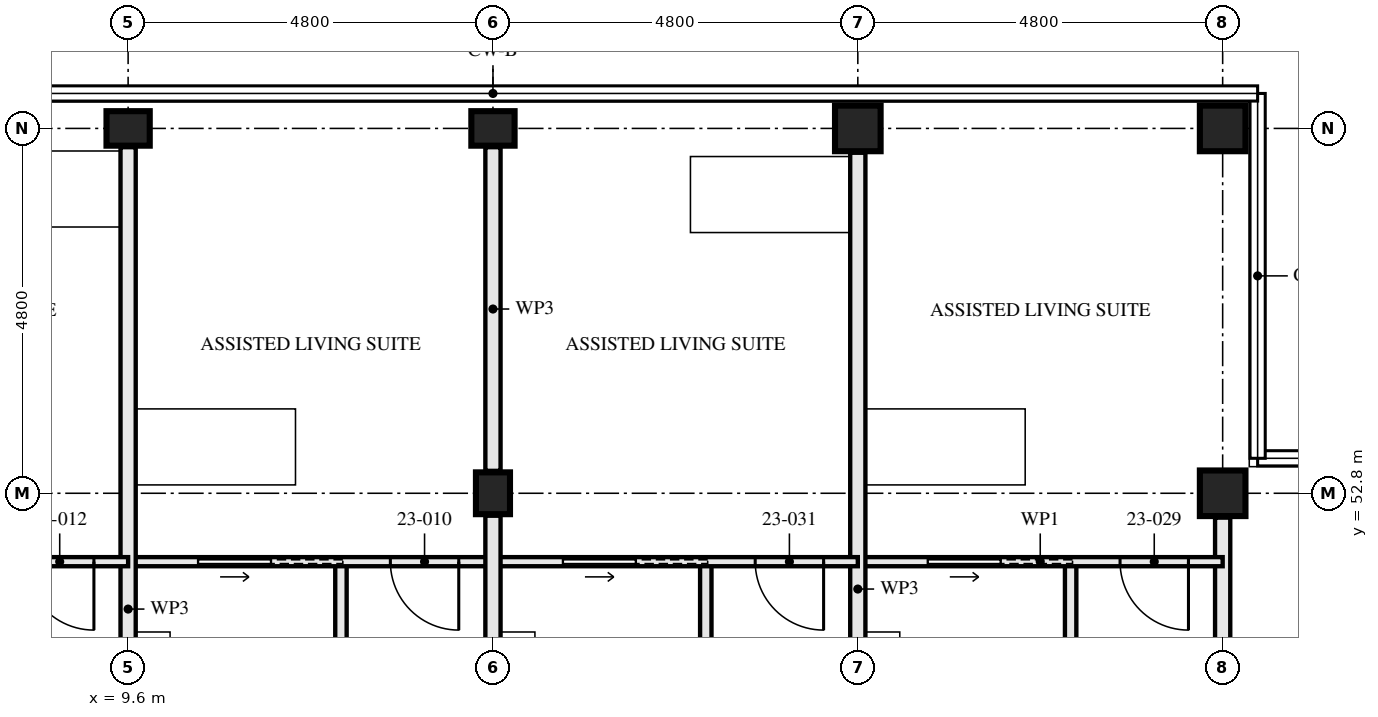
"""IFC4 building model, lengths in metres.
Left out: names, types, materials, properties, quantities, classifications, styles, units other than length and angle.
Written with IfcOpenShell. Run it as: python <this file> out.ifc"""

import sys

from ifc_helpers import new_model, si_unit, direction, frame, frame_2d, origin, origin_2d, place, context, subcontext, project, spatial, rectangle, hollow_rectangle, i_section, extrude, element, fill, save


model = new_model("IFC4")
c1 = context("Model", 3, precision=1e-05, world=origin(), true_north=direction((0.0, 1.0)))
c2 = subcontext(c1, "Body", "Model", "MODEL_VIEW")
j1 = project(units=[si_unit("LENGTHUNIT", "METRE"), si_unit("PLANEANGLEUNIT", "RADIAN")], contexts=[c1])
p1 = place(None, origin())
s1 = spatial("IfcSite", under=j1, at=p1, CompositionType="ELEMENT")
p2 = place(p1, origin())
s2 = spatial("IfcBuilding", under=s1, at=p2, CompositionType="ELEMENT")
p3 = place(p2, frame((0.0, 0.0, 87.5)))
s3 = spatial("IfcBuildingStorey", under=s2, at=p3, CompositionType="ELEMENT", Elevation=87.5)
p4 = place(p3, frame((9.6, 57.6, 0.0), z_axis=(0.0, 0.0, 1.0), x_axis=(0.0, 1.0, 0.0)))
e1 = element("IfcColumn", 1, at=p4, inside=s3, PredefinedType="COLUMN", context=c2, shape_type="SweptSolid", body=[
    extrude(i_section(OverallWidth=0.454, OverallDepth=0.569, WebThickness=0.078, FlangeThickness=0.125, FilletRadius=0.015, at=origin_2d()), origin(), (0.0, 0.0, 1.0), 3.5),
])
p5 = place(p3, frame((14.4, 52.8, 0.0), z_axis=(0.0, 0.0, 1.0), x_axis=(1.0, 0.0, 0.0)))
e2 = element("IfcColumn", 2, at=p5, inside=s3, PredefinedType="COLUMN", context=c2, shape_type="SweptSolid", body=[
    extrude(i_section(OverallWidth=0.448, OverallDepth=0.55, WebThickness=0.072, FlangeThickness=0.115, FilletRadius=0.015, at=origin_2d()), origin(), (0.0, 0.0, 1.0), 3.5),
])
p6 = place(p3, frame((14.4, 57.6, 0.0), z_axis=(0.0, 0.0, 1.0), x_axis=(0.0, 1.0, 0.0)))
e3 = element("IfcColumn", 3, at=p6, inside=s3, PredefinedType="COLUMN", context=c2, shape_type="SweptSolid", body=[
    extrude(i_section(OverallWidth=0.454, OverallDepth=0.569, WebThickness=0.078, FlangeThickness=0.125, FilletRadius=0.015, at=origin_2d()), origin(), (0.0, 0.0, 1.0), 3.5),
])
for number, where, z_axis, x_axis in (
    (4, (19.2, 57.6, 0.0), (0.0, 0.0, 1.0), (0.0, 1.0, 0.0)),
    (5, (24.0, 52.8, 0.0), (0.0, 0.0, 1.0), (0.0, 1.0, 0.0)),
    (6, (24.0, 57.6, 0.0), (0.0, 0.0, 1.0), (0.0, 1.0, 0.0)),
):
    element("IfcColumn", number, at=place(p3, frame(where, z_axis=z_axis, x_axis=x_axis)), inside=s3, PredefinedType="COLUMN", context=c2, shape_type="SweptSolid", body=[
        extrude(hollow_rectangle(XDim=0.6, YDim=0.6, WallThickness=0.08, at=origin_2d()), origin(), (0.0, 0.0, 1.0), 3.5),
    ])
p7 = place(p3, frame((12.4, 51.9, 0.0), z_axis=(0.0, 0.0, 1.0), x_axis=(0.0, -1.0, 0.0)))
e7 = element("IfcWall", 7, at=p7, inside=s3, PredefinedType="PARTITIONING", context=c2, shape_type="SweptSolid", body=[
    extrude(rectangle(XDim=3.0, YDim=0.15, at=frame_2d((1.5, 0.0))), origin(), (0.0, 0.0, 1.0), 3.33),
])
p8 = place(p3, frame((14.4, 51.9, 0.0), z_axis=(0.0, 0.0, 1.0), x_axis=(-1.0, 0.0, 0.0)))
e8 = element("IfcWall", 8, at=p8, inside=s3, PredefinedType="PARTITIONING", context=c2, shape_type="SweptSolid", body=[
    extrude(rectangle(XDim=4.8, YDim=0.12, at=frame_2d((2.4, 0.0))), origin(), (0.0, 0.0, 1.0), 3.33),
])
p9 = place(p8, frame((0.45, 0.0, 0.0)))
e9 = element("IfcOpeningElement", 9, at=p9, cuts=e8, PredefinedType="OPENING", context=c2, shape_type="SweptSolid", body=[
    extrude(rectangle(XDim=0.9, YDim=2.1, at=frame_2d((0.45, 1.05))), frame((0.0, 0.071, 0.0), z_axis=(0.0, -1.0, 0.0), x_axis=(1.0, 0.0, 0.0)), (0.0, 0.0, 1.0), 0.141),
])
p10 = place(p8, frame((2.925, 0.0, 0.0)))
e10 = element("IfcOpeningElement", 10, at=p10, cuts=e8, PredefinedType="OPENING", context=c2, shape_type="SweptSolid", body=[
    extrude(rectangle(XDim=0.95, YDim=2.1, at=frame_2d((0.475, 1.05))), frame((0.0, 0.071, 0.0), z_axis=(0.0, -1.0, 0.0), x_axis=(1.0, 0.0, 0.0)), (0.0, 0.0, 1.0), 0.141),
])
p11 = place(p3, frame((9.6, 57.353, 0.0), z_axis=(0.0, 0.0, 1.0), x_axis=(0.0, -1.0, 0.0)))
e11 = element("IfcWall", 11, at=p11, inside=s3, PredefinedType="PARTITIONING", context=c2, shape_type="SweptSolid", body=[
    extrude(rectangle(XDim=12.153, YDim=0.2, at=frame_2d((6.077, 0.0))), origin(), (0.0, 0.0, 1.0), 2.55),
])
p12 = place(p3, frame((9.6, 51.9, 0.0), z_axis=(0.0, 0.0, 1.0), x_axis=(-1.0, 0.0, 0.0)))
e12 = element("IfcWall", 12, at=p12, inside=s3, PredefinedType="PARTITIONING", context=c2, shape_type="SweptSolid", body=[
    extrude(rectangle(XDim=4.8, YDim=0.12, at=frame_2d((2.4, 0.0))), origin(), (0.0, 0.0, 1.0), 3.33),
])
p13 = place(p12, frame((0.45, 0.0, 0.0)))
e13 = element("IfcOpeningElement", 13, at=p13, cuts=e12, PredefinedType="OPENING", context=c2, shape_type="SweptSolid", body=[
    extrude(rectangle(XDim=0.9, YDim=2.1, at=frame_2d((0.45, 1.05))), frame((0.0, 0.071, 0.0), z_axis=(0.0, -1.0, 0.0), x_axis=(1.0, 0.0, 0.0)), (0.0, 0.0, 1.0), 0.141),
])
p14 = place(p12, frame((2.925, 0.0, 0.0)))
e14 = element("IfcOpeningElement", 14, at=p14, cuts=e12, PredefinedType="OPENING", context=c2, shape_type="SweptSolid", body=[
    extrude(rectangle(XDim=0.95, YDim=2.1, at=frame_2d((0.475, 1.05))), frame((0.0, 0.071, 0.0), z_axis=(0.0, -1.0, 0.0), x_axis=(1.0, 0.0, 0.0)), (0.0, 0.0, 1.0), 0.141),
])
p15 = place(p3, frame((24.0, 52.48, 0.0), z_axis=(0.0, 0.0, 1.0), x_axis=(0.0, -1.0, 0.0)))
e15 = element("IfcWall", 15, at=p15, inside=s3, PredefinedType="PARTITIONING", context=c2, shape_type="SweptSolid", body=[
    extrude(rectangle(XDim=6.68, YDim=0.2, at=frame_2d((3.34, 0.0))), origin(), (0.0, 0.0, 1.0), 2.55),
])
p16 = place(p3, frame((22.0, 51.9, 0.0), z_axis=(0.0, 0.0, 1.0), x_axis=(0.0, -1.0, 0.0)))
e16 = element("IfcWall", 16, at=p16, inside=s3, PredefinedType="PARTITIONING", context=c2, shape_type="SweptSolid", body=[
    extrude(rectangle(XDim=3.0, YDim=0.15, at=frame_2d((1.5, 0.0))), origin(), (0.0, 0.0, 1.0), 3.33),
])
p17 = place(p3, frame((24.0, 51.9, 0.0), z_axis=(0.0, 0.0, 1.0), x_axis=(-1.0, 0.0, 0.0)))
e17 = element("IfcWall", 17, at=p17, inside=s3, PredefinedType="PARTITIONING", context=c2, shape_type="SweptSolid", body=[
    extrude(rectangle(XDim=4.8, YDim=0.12, at=frame_2d((2.4, 0.0))), origin(), (0.0, 0.0, 1.0), 3.33),
])
p18 = place(p17, frame((0.45, 0.0, 0.0)))
e18 = element("IfcOpeningElement", 18, at=p18, cuts=e17, PredefinedType="OPENING", context=c2, shape_type="SweptSolid", body=[
    extrude(rectangle(XDim=0.9, YDim=2.1, at=frame_2d((0.45, 1.05))), frame((0.0, 0.071, 0.0), z_axis=(0.0, -1.0, 0.0), x_axis=(1.0, 0.0, 0.0)), (0.0, 0.0, 1.0), 0.141),
])
p19 = place(p17, frame((2.925, 0.0, 0.0)))
e19 = element("IfcOpeningElement", 19, at=p19, cuts=e17, PredefinedType="OPENING", context=c2, shape_type="SweptSolid", body=[
    extrude(rectangle(XDim=0.95, YDim=2.1, at=frame_2d((0.475, 1.05))), frame((0.0, 0.071, 0.0), z_axis=(0.0, -1.0, 0.0), x_axis=(1.0, 0.0, 0.0)), (0.0, 0.0, 1.0), 0.141),
])
p20 = place(p3, frame((19.2, 57.28, 0.0), z_axis=(0.0, 0.0, 1.0), x_axis=(0.0, -1.0, 0.0)))
e20 = element("IfcWall", 20, at=p20, inside=s3, PredefinedType="PARTITIONING", context=c2, shape_type="SweptSolid", body=[
    extrude(rectangle(XDim=11.48, YDim=0.2, at=frame_2d((5.74, 0.0))), origin(), (0.0, 0.0, 1.0), 2.55),
])
p21 = place(p3, frame((17.2, 51.9, 0.0), z_axis=(0.0, 0.0, 1.0), x_axis=(0.0, -1.0, 0.0)))
e21 = element("IfcWall", 21, at=p21, inside=s3, PredefinedType="PARTITIONING", context=c2, shape_type="SweptSolid", body=[
    extrude(rectangle(XDim=3.0, YDim=0.15, at=frame_2d((1.5, 0.0))), origin(), (0.0, 0.0, 1.0), 3.33),
])
p22 = place(p3, frame((19.2, 51.9, 0.0), z_axis=(0.0, 0.0, 1.0), x_axis=(-1.0, 0.0, 0.0)))
e22 = element("IfcWall", 22, at=p22, inside=s3, PredefinedType="PARTITIONING", context=c2, shape_type="SweptSolid", body=[
    extrude(rectangle(XDim=4.8, YDim=0.12, at=frame_2d((2.4, 0.0))), origin(), (0.0, 0.0, 1.0), 3.33),
])
p23 = place(p22, frame((0.45, 0.0, 0.0)))
e23 = element("IfcOpeningElement", 23, at=p23, cuts=e22, PredefinedType="OPENING", context=c2, shape_type="SweptSolid", body=[
    extrude(rectangle(XDim=0.9, YDim=2.1, at=frame_2d((0.45, 1.05))), frame((0.0, 0.071, 0.0), z_axis=(0.0, -1.0, 0.0), x_axis=(1.0, 0.0, 0.0)), (0.0, 0.0, 1.0), 0.141),
])
p24 = place(p22, frame((2.925, 0.0, 0.0)))
e24 = element("IfcOpeningElement", 24, at=p24, cuts=e22, PredefinedType="OPENING", context=c2, shape_type="SweptSolid", body=[
    extrude(rectangle(XDim=0.95, YDim=2.1, at=frame_2d((0.475, 1.05))), frame((0.0, 0.071, 0.0), z_axis=(0.0, -1.0, 0.0), x_axis=(1.0, 0.0, 0.0)), (0.0, 0.0, 1.0), 0.141),
])
p25 = place(p3, frame((14.4, 48.295, 0.0), z_axis=(0.0, 0.0, 1.0), x_axis=(0.0, 1.0, 0.0)))
e25 = element("IfcWall", 25, at=p25, inside=s3, PredefinedType="PARTITIONING", context=c2, shape_type="SweptSolid", body=[
    extrude(rectangle(XDim=4.21, YDim=0.2, at=frame_2d((2.105, 0.0))), origin(), (0.0, 0.0, 1.0), 2.32),
])
p26 = place(p3, frame((14.4, 53.095, 0.0), z_axis=(0.0, 0.0, 1.0), x_axis=(0.0, 1.0, 0.0)))
e26 = element("IfcWall", 26, at=p26, inside=s3, PredefinedType="PARTITIONING", context=c2, shape_type="SweptSolid", body=[
    extrude(rectangle(XDim=4.258, YDim=0.2, at=frame_2d((2.129, 0.0))), origin(), (0.0, 0.0, 1.0), 2.32),
])
p27 = place(p9, origin())
e27 = element("IfcDoor", 27, at=p27, inside=s3, OperationType="SINGLE_SWING_RIGHT", PredefinedType="DOOR", context=c2, shape_type="SweptSolid", body=[
    extrude(rectangle(XDim=0.9, YDim=2.1, at=frame_2d((0.45, 1.05))), frame((0.0, 0.022, 0.0), z_axis=(0.0, -1.0, 0.0), x_axis=(1.0, 0.0, 0.0)), (0.0, 0.0, 1.0), 0.044),
])
fill(e9, e27)
p28 = place(p10, origin())
e28 = element("IfcDoor", 28, at=p28, inside=s3, OperationType="SLIDING_TO_RIGHT", PredefinedType="DOOR", context=c2, shape_type="SweptSolid", body=[
    extrude(rectangle(XDim=0.95, YDim=2.1, at=frame_2d((0.475, 1.05))), frame((0.0, 0.022, 0.0), z_axis=(0.0, -1.0, 0.0), x_axis=(1.0, 0.0, 0.0)), (0.0, 0.0, 1.0), 0.044),
])
fill(e10, e28)
p29 = place(p13, origin())
e29 = element("IfcDoor", 29, at=p29, inside=s3, OperationType="SINGLE_SWING_RIGHT", PredefinedType="DOOR", context=c2, shape_type="SweptSolid", body=[
    extrude(rectangle(XDim=0.9, YDim=2.1, at=frame_2d((0.45, 1.05))), frame((0.0, 0.022, 0.0), z_axis=(0.0, -1.0, 0.0), x_axis=(1.0, 0.0, 0.0)), (0.0, 0.0, 1.0), 0.044),
])
fill(e13, e29)
p30 = place(p18, origin())
e30 = element("IfcDoor", 30, at=p30, inside=s3, OperationType="SINGLE_SWING_RIGHT", PredefinedType="DOOR", context=c2, shape_type="SweptSolid", body=[
    extrude(rectangle(XDim=0.9, YDim=2.1, at=frame_2d((0.45, 1.05))), frame((0.0, 0.022, 0.0), z_axis=(0.0, -1.0, 0.0), x_axis=(1.0, 0.0, 0.0)), (0.0, 0.0, 1.0), 0.044),
])
fill(e18, e30)
p31 = place(p19, origin())
e31 = element("IfcDoor", 31, at=p31, inside=s3, OperationType="SLIDING_TO_RIGHT", PredefinedType="DOOR", context=c2, shape_type="SweptSolid", body=[
    extrude(rectangle(XDim=0.95, YDim=2.1, at=frame_2d((0.475, 1.05))), frame((0.0, 0.022, 0.0), z_axis=(0.0, -1.0, 0.0), x_axis=(1.0, 0.0, 0.0)), (0.0, 0.0, 1.0), 0.044),
])
fill(e19, e31)
p32 = place(p23, origin())
e32 = element("IfcDoor", 32, at=p32, inside=s3, OperationType="SINGLE_SWING_RIGHT", PredefinedType="DOOR", context=c2, shape_type="SweptSolid", body=[
    extrude(rectangle(XDim=0.9, YDim=2.1, at=frame_2d((0.45, 1.05))), frame((0.0, 0.022, 0.0), z_axis=(0.0, -1.0, 0.0), x_axis=(1.0, 0.0, 0.0)), (0.0, 0.0, 1.0), 0.044),
])
fill(e23, e32)
p33 = place(p24, origin())
e33 = element("IfcDoor", 33, at=p33, inside=s3, OperationType="SLIDING_TO_RIGHT", PredefinedType="DOOR", context=c2, shape_type="SweptSolid", body=[
    extrude(rectangle(XDim=0.95, YDim=2.1, at=frame_2d((0.475, 1.05))), frame((0.0, 0.022, 0.0), z_axis=(0.0, -1.0, 0.0), x_axis=(1.0, 0.0, 0.0)), (0.0, 0.0, 1.0), 0.044),
])
fill(e24, e33)
save(model, sys.argv[1])
